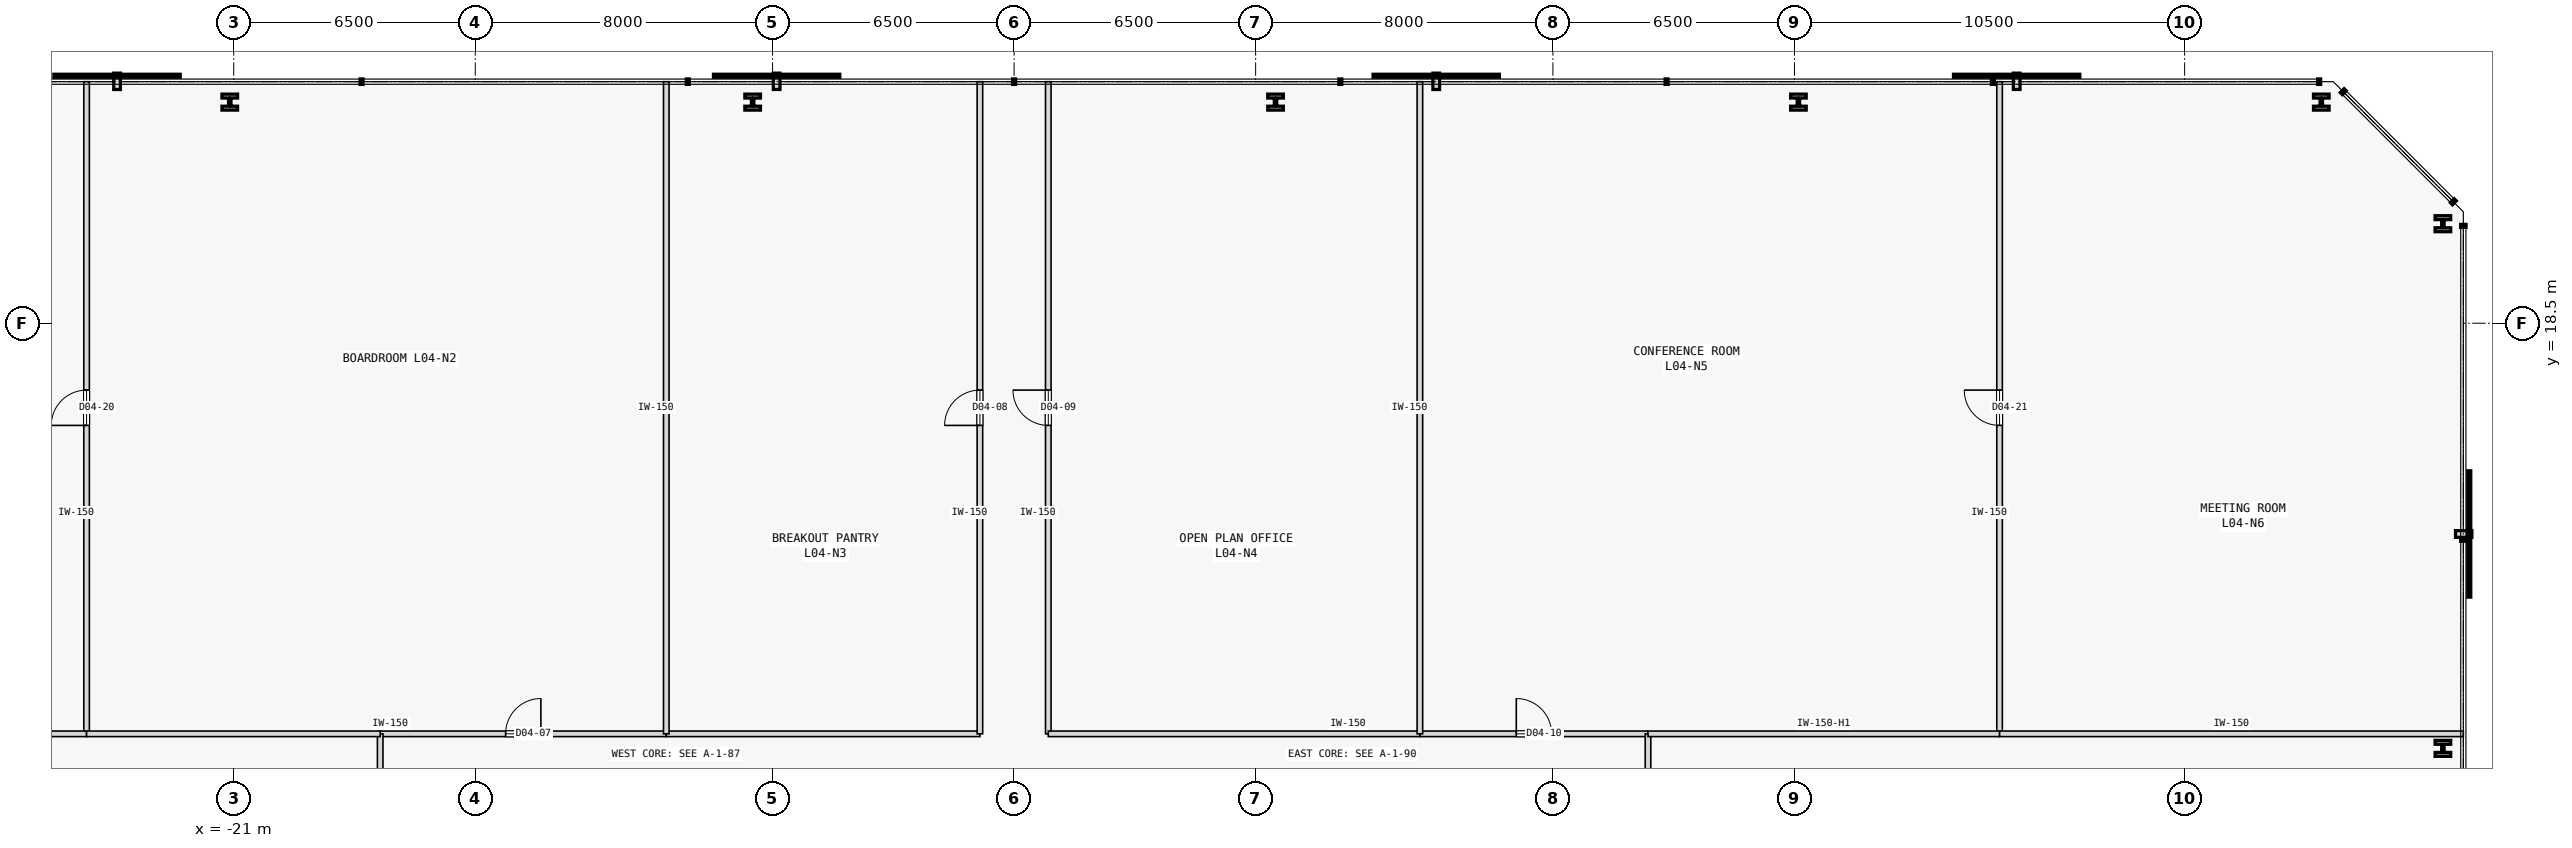
"""IFC4 building model, lengths in metres.
Left out: names, types, materials, properties, quantities, classifications, styles, units other than length and angle.
Written with IfcOpenShell. Run it as: python <this file> out.ifc"""

import sys

from ifc_helpers import new_model, si_unit, direction, frame, frame_2d, origin, origin_2d, place, context, subcontext, project, spatial, rectangle, i_section, extrude, element, fill, save


model = new_model("IFC4")
c1 = context("Model", 3, precision=1e-05, world=origin(), true_north=direction((0.0, 1.0)))
c2 = subcontext(c1, "Body", "Model", "MODEL_VIEW")
j1 = project(units=[si_unit("LENGTHUNIT", "METRE"), si_unit("PLANEANGLEUNIT", "RADIAN")], contexts=[c1])
p1 = place(None, origin())
s1 = spatial("IfcSite", under=j1, at=p1, CompositionType="ELEMENT")
p2 = place(p1, origin())
s2 = spatial("IfcBuilding", under=s1, at=p2, CompositionType="ELEMENT")
p3 = place(p2, frame((0.0, 0.0, 21.8)))
s3 = spatial("IfcBuildingStorey", under=s2, at=p3, CompositionType="ELEMENT", Elevation=21.8)
for number, where, z_axis, x_axis in (
    (1, (38.45, 7.059, 0.0), (0.0, 0.0, 1.0), (1.0, 0.0, 0.0)),
    (2, (38.45, 21.178, 0.0), (0.0, 0.0, 1.0), (1.0, 0.0, 0.0)),
    (3, (35.178, 24.45, 0.0), (0.0, 0.0, 1.0), (1.0, 0.0, 0.0)),
    (4, (21.107, 24.45, 0.0), (0.0, 0.0, 1.0), (1.0, 0.0, 0.0)),
    (5, (7.036, 24.45, 0.0), (0.0, 0.0, 1.0), (1.0, 0.0, 0.0)),
    (6, (-7.036, 24.45, 0.0), (0.0, 0.0, 1.0), (1.0, 0.0, 0.0)),
    (7, (-21.107, 24.45, 0.0), (0.0, 0.0, 1.0), (1.0, 0.0, 0.0)),
):
    element("IfcColumn", number, at=place(p3, frame(where, z_axis=z_axis, x_axis=x_axis)), inside=s3, PredefinedType="COLUMN", context=c2, shape_type="SweptSolid", body=[
        extrude(i_section(OverallWidth=0.42, OverallDepth=0.431, WebThickness=0.065, FlangeThickness=0.106, FilletRadius=0.015, at=origin_2d()), origin(), (0.0, 0.0, 1.0), 3.8),
    ])
p4 = place(p3, frame((-17.059, 7.45, 0.0), z_axis=(0.0, 0.0, 1.0), x_axis=(1.0, 0.0, 0.0)))
e8 = element("IfcWall", 8, at=p4, inside=s3, PredefinedType="PARTITIONING", context=c2, shape_type="SweptSolid", body=[
    extrude(rectangle(XDim=7.699, YDim=0.15, at=frame_2d((3.85, 0.0))), origin(), (0.0, 0.0, 1.0), 3.575),
])
p5 = place(p4, frame((3.375, 0.0, 0.0)))
e9 = element("IfcOpeningElement", 9, at=p5, cuts=e8, PredefinedType="OPENING", context=c2, shape_type="SweptSolid", body=[
    extrude(rectangle(XDim=0.95, YDim=2.15, at=frame_2d((0.475, 1.075))), frame((0.0, 0.085, 0.0), z_axis=(0.0, -1.0, 0.0), x_axis=(1.0, 0.0, 0.0)), (0.0, 0.0, 1.0), 0.17),
])
p6 = place(p3, frame((-9.36, 7.45, 0.0), z_axis=(0.0, 0.0, 1.0), x_axis=(1.0, 0.0, 0.0)))
e10 = element("IfcWall", 10, at=p6, inside=s3, PredefinedType="PARTITIONING", context=c2, shape_type="SweptSolid", body=[
    extrude(rectangle(XDim=8.44, YDim=0.15, at=frame_2d((4.22, 0.0))), origin(), (0.0, 0.0, 1.0), 3.575),
])
p7 = place(p3, frame((-0.92, 7.45, 0.0), z_axis=(0.0, 0.0, 1.0), x_axis=(0.0, 1.0, 0.0)))
e11 = element("IfcWall", 11, at=p7, inside=s3, PredefinedType="PARTITIONING", context=c2, shape_type="SweptSolid", body=[
    extrude(rectangle(XDim=17.55, YDim=0.15, at=frame_2d((8.775, 0.0))), origin(), (0.0, 0.0, 1.0), 3.575),
])
p8 = place(p7, frame((8.3, 0.0, 0.0)))
e12 = element("IfcOpeningElement", 12, at=p8, cuts=e11, PredefinedType="OPENING", context=c2, shape_type="SweptSolid", body=[
    extrude(rectangle(XDim=0.95, YDim=2.15, at=frame_2d((0.475, 1.075))), frame((0.0, 0.085, 0.0), z_axis=(0.0, -1.0, 0.0), x_axis=(1.0, 0.0, 0.0)), (0.0, 0.0, 1.0), 0.17),
])
p9 = place(p3, frame((0.92, 7.45, 0.0), z_axis=(0.0, 0.0, 1.0), x_axis=(0.0, 1.0, 0.0)))
e13 = element("IfcWall", 13, at=p9, inside=s3, PredefinedType="PARTITIONING", context=c2, shape_type="SweptSolid", body=[
    extrude(rectangle(XDim=17.55, YDim=0.15, at=frame_2d((8.775, 0.0))), origin(), (0.0, 0.0, 1.0), 3.575),
])
p10 = place(p9, frame((8.3, 0.0, 0.0)))
e14 = element("IfcOpeningElement", 14, at=p10, cuts=e13, PredefinedType="OPENING", context=c2, shape_type="SweptSolid", body=[
    extrude(rectangle(XDim=0.95, YDim=2.15, at=frame_2d((0.475, 1.075))), frame((0.0, 0.085, 0.0), z_axis=(0.0, -1.0, 0.0), x_axis=(1.0, 0.0, 0.0)), (0.0, 0.0, 1.0), 0.17),
])
p11 = place(p3, frame((0.92, 7.45, 0.0), z_axis=(0.0, 0.0, 1.0), x_axis=(1.0, 0.0, 0.0)))
e15 = element("IfcWall", 15, at=p11, inside=s3, PredefinedType="PARTITIONING", context=c2, shape_type="SweptSolid", body=[
    extrude(rectangle(XDim=10.0, YDim=0.15, at=frame_2d((5.0, 0.0))), origin(), (0.0, 0.0, 1.0), 3.575),
])
p12 = place(p3, frame((10.92, 7.45, 0.0), z_axis=(0.0, 0.0, 1.0), x_axis=(1.0, 0.0, 0.0)))
e16 = element("IfcWall", 16, at=p12, inside=s3, PredefinedType="PARTITIONING", context=c2, shape_type="SweptSolid", body=[
    extrude(rectangle(XDim=6.139, YDim=0.15, at=frame_2d((3.07, 0.0))), origin(), (0.0, 0.0, 1.0), 3.575),
])
p13 = place(p12, frame((2.594, 0.0, 0.0)))
e17 = element("IfcOpeningElement", 17, at=p13, cuts=e16, PredefinedType="OPENING", context=c2, shape_type="SweptSolid", body=[
    extrude(rectangle(XDim=0.95, YDim=2.15, at=frame_2d((0.475, 1.075))), frame((0.0, 0.085, 0.0), z_axis=(0.0, -1.0, 0.0), x_axis=(1.0, 0.0, 0.0)), (0.0, 0.0, 1.0), 0.17),
])
p14 = place(p3, frame((-17.059, 0.92, 0.0), z_axis=(0.0, 0.0, 1.0), x_axis=(0.0, 1.0, 0.0)))
e18 = element("IfcWall", 18, at=p14, inside=s3, PredefinedType="PARTITIONING", context=c2, shape_type="SweptSolid", body=[
    extrude(rectangle(XDim=6.53, YDim=0.15, at=frame_2d((3.265, 0.0))), origin(), (0.0, 0.0, 1.0), 3.575),
])
p15 = place(p3, frame((17.059, 2.384, 0.0), z_axis=(0.0, 0.0, 1.0), x_axis=(0.0, 1.0, 0.0)))
e19 = element("IfcWall", 19, at=p15, inside=s3, PredefinedType="PARTITIONING", context=c2, shape_type="SweptSolid", body=[
    extrude(rectangle(XDim=5.066, YDim=0.15, at=frame_2d((2.533, 0.0))), origin(), (0.0, 0.0, 1.0), 3.575),
])
p16 = place(p15, frame((0.639, 0.0, 0.0)))
e20 = element("IfcOpeningElement", 20, at=p16, cuts=e19, PredefinedType="OPENING", context=c2, shape_type="SweptSolid", body=[
    extrude(rectangle(XDim=0.95, YDim=2.15, at=frame_2d((0.475, 1.075))), frame((0.0, 0.085, 0.0), z_axis=(0.0, -1.0, 0.0), x_axis=(1.0, 0.0, 0.0)), (0.0, 0.0, 1.0), 0.17),
])
p17 = place(p3, frame((-24.96, 7.45, 0.0), z_axis=(0.0, 0.0, 1.0), x_axis=(0.0, 1.0, 0.0)))
e21 = element("IfcWall", 21, at=p17, inside=s3, PredefinedType="PARTITIONING", context=c2, shape_type="SweptSolid", body=[
    extrude(rectangle(XDim=17.55, YDim=0.15, at=frame_2d((8.775, 0.0))), origin(), (0.0, 0.0, 1.0), 3.575),
])
p18 = place(p17, frame((8.3, 0.0, 0.0)))
e22 = element("IfcOpeningElement", 22, at=p18, cuts=e21, PredefinedType="OPENING", context=c2, shape_type="SweptSolid", body=[
    extrude(rectangle(XDim=0.95, YDim=2.15, at=frame_2d((0.475, 1.075))), frame((0.0, 0.085, 0.0), z_axis=(0.0, -1.0, 0.0), x_axis=(1.0, 0.0, 0.0)), (0.0, 0.0, 1.0), 0.17),
])
p19 = place(p3, frame((-39.0, 7.45, 0.0), z_axis=(0.0, 0.0, 1.0), x_axis=(1.0, 0.0, 0.0)))
e23 = element("IfcWall", 23, at=p19, inside=s3, PredefinedType="PARTITIONING", context=c2, shape_type="SweptSolid", body=[
    extrude(rectangle(XDim=14.04, YDim=0.15, at=frame_2d((7.02, 0.0))), origin(), (0.0, 0.0, 1.0), 3.125),
])
p20 = place(p3, frame((-9.36, 7.45, 0.0), z_axis=(0.0, 0.0, 1.0), x_axis=(0.0, 1.0, 0.0)))
e24 = element("IfcWall", 24, at=p20, inside=s3, PredefinedType="PARTITIONING", context=c2, shape_type="SweptSolid", body=[
    extrude(rectangle(XDim=17.55, YDim=0.15, at=frame_2d((8.775, 0.0))), origin(), (0.0, 0.0, 1.0), 3.575),
])
p21 = place(p3, frame((-24.96, 7.45, 0.0), z_axis=(0.0, 0.0, 1.0), x_axis=(1.0, 0.0, 0.0)))
e25 = element("IfcWall", 25, at=p21, inside=s3, PredefinedType="PARTITIONING", context=c2, shape_type="SweptSolid", body=[
    extrude(rectangle(XDim=7.901, YDim=0.15, at=frame_2d((3.95, 0.0))), origin(), (0.0, 0.0, 1.0), 3.575),
])
p22 = place(p3, frame((10.92, 7.45, 0.0), z_axis=(0.0, 0.0, 1.0), x_axis=(0.0, 1.0, 0.0)))
e26 = element("IfcWall", 26, at=p22, inside=s3, PredefinedType="PARTITIONING", context=c2, shape_type="SweptSolid", body=[
    extrude(rectangle(XDim=17.55, YDim=0.15, at=frame_2d((8.775, 0.0))), origin(), (0.0, 0.0, 1.0), 3.575),
])
p23 = place(p3, frame((26.52, 7.45, 0.0), z_axis=(0.0, 0.0, 1.0), x_axis=(0.0, 1.0, 0.0)))
e27 = element("IfcWall", 27, at=p23, inside=s3, PredefinedType="PARTITIONING", context=c2, shape_type="SweptSolid", body=[
    extrude(rectangle(XDim=17.55, YDim=0.15, at=frame_2d((8.775, 0.0))), origin(), (0.0, 0.0, 1.0), 3.575),
])
p24 = place(p23, frame((8.3, 0.0, 0.0)))
e28 = element("IfcOpeningElement", 28, at=p24, cuts=e27, PredefinedType="OPENING", context=c2, shape_type="SweptSolid", body=[
    extrude(rectangle(XDim=0.95, YDim=2.15, at=frame_2d((0.475, 1.075))), frame((0.0, 0.085, 0.0), z_axis=(0.0, -1.0, 0.0), x_axis=(1.0, 0.0, 0.0)), (0.0, 0.0, 1.0), 0.17),
])
p25 = place(p3, frame((17.059, 7.45, 0.0), z_axis=(0.0, 0.0, 1.0), x_axis=(1.0, 0.0, 0.0)))
e29 = element("IfcWall", 29, at=p25, inside=s3, PredefinedType="PARTITIONING", context=c2, shape_type="SweptSolid", body=[
    extrude(rectangle(XDim=9.461, YDim=0.15, at=frame_2d((4.73, 0.0))), origin(), (0.0, 0.0, 1.0), 3.125),
])
p26 = place(p3, frame((26.52, 7.45, 0.0), z_axis=(0.0, 0.0, 1.0), x_axis=(1.0, 0.0, 0.0)))
e30 = element("IfcWall", 30, at=p26, inside=s3, PredefinedType="PARTITIONING", context=c2, shape_type="SweptSolid", body=[
    extrude(rectangle(XDim=12.48, YDim=0.15, at=frame_2d((6.24, 0.0))), origin(), (0.0, 0.0, 1.0), 3.575),
])
p27 = place(p5, origin())
e31 = element("IfcDoor", 31, at=p27, inside=s3, OperationType="SINGLE_SWING_RIGHT", PredefinedType="DOOR", context=c2, shape_type="SweptSolid", body=[
    extrude(rectangle(XDim=0.95, YDim=2.15, at=frame_2d((0.475, 1.075))), frame((0.0, 0.025, 0.0), z_axis=(0.0, -1.0, 0.0), x_axis=(1.0, 0.0, 0.0)), (0.0, 0.0, 1.0), 0.05),
])
fill(e9, e31)
p28 = place(p8, origin())
e32 = element("IfcDoor", 32, at=p28, inside=s3, OperationType="SINGLE_SWING_LEFT", PredefinedType="DOOR", context=c2, shape_type="SweptSolid", body=[
    extrude(rectangle(XDim=0.95, YDim=2.15, at=frame_2d((0.475, 1.075))), frame((0.0, 0.025, 0.0), z_axis=(0.0, -1.0, 0.0), x_axis=(1.0, 0.0, 0.0)), (0.0, 0.0, 1.0), 0.05),
])
fill(e12, e32)
p29 = place(p10, origin())
e33 = element("IfcDoor", 33, at=p29, inside=s3, OperationType="SINGLE_SWING_RIGHT", PredefinedType="DOOR", context=c2, shape_type="SweptSolid", body=[
    extrude(rectangle(XDim=0.95, YDim=2.15, at=frame_2d((0.475, 1.075))), frame((0.0, 0.025, 0.0), z_axis=(0.0, -1.0, 0.0), x_axis=(1.0, 0.0, 0.0)), (0.0, 0.0, 1.0), 0.05),
])
fill(e14, e33)
p30 = place(p13, origin())
e34 = element("IfcDoor", 34, at=p30, inside=s3, OperationType="SINGLE_SWING_LEFT", PredefinedType="DOOR", context=c2, shape_type="SweptSolid", body=[
    extrude(rectangle(XDim=0.95, YDim=2.15, at=frame_2d((0.475, 1.075))), frame((0.0, 0.025, 0.0), z_axis=(0.0, -1.0, 0.0), x_axis=(1.0, 0.0, 0.0)), (0.0, 0.0, 1.0), 0.05),
])
fill(e17, e34)
p31 = place(p18, origin())
e35 = element("IfcDoor", 35, at=p31, inside=s3, OperationType="SINGLE_SWING_LEFT", PredefinedType="DOOR", context=c2, shape_type="SweptSolid", body=[
    extrude(rectangle(XDim=0.95, YDim=2.15, at=frame_2d((0.475, 1.075))), frame((0.0, 0.025, 0.0), z_axis=(0.0, -1.0, 0.0), x_axis=(1.0, 0.0, 0.0)), (0.0, 0.0, 1.0), 0.05),
])
fill(e22, e35)
p32 = place(p24, origin())
e36 = element("IfcDoor", 36, at=p32, inside=s3, OperationType="SINGLE_SWING_RIGHT", PredefinedType="DOOR", context=c2, shape_type="SweptSolid", body=[
    extrude(rectangle(XDim=0.95, YDim=2.15, at=frame_2d((0.475, 1.075))), frame((0.0, 0.025, 0.0), z_axis=(0.0, -1.0, 0.0), x_axis=(1.0, 0.0, 0.0)), (0.0, 0.0, 1.0), 0.05),
])
fill(e28, e36)
save(model, sys.argv[1])
